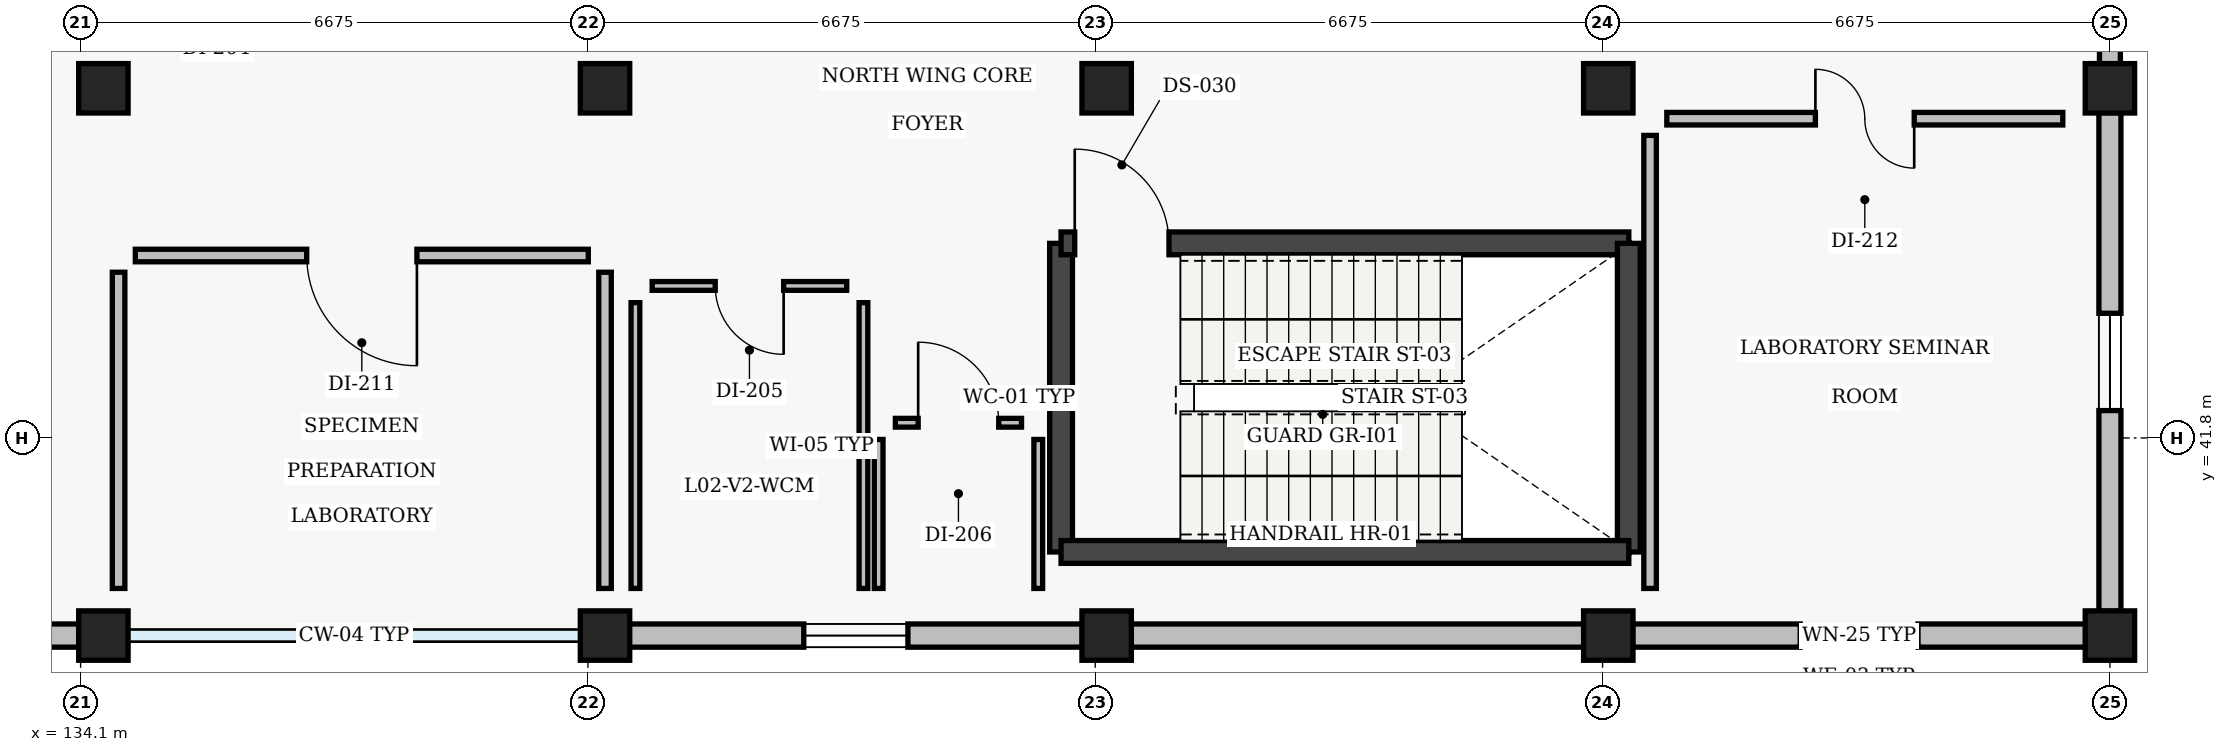
"""IFC4 building model, lengths in metres.
Left out: names, types, materials, properties, quantities, classifications, styles, units other than length and angle.
Written with IfcOpenShell. Run it as: python <this file> out.ifc"""

import sys

from ifc_helpers import new_model, si_unit, direction, frame, frame_2d, origin, origin_2d, place, context, subcontext, project, spatial, rectangle, extrude, element, fill, save


model = new_model("IFC4")
c1 = context("Model", 3, precision=1e-05, world=origin(), true_north=direction((0.0, 1.0)))
c2 = subcontext(c1, "Body", "Model", "MODEL_VIEW")
j1 = project(units=[si_unit("LENGTHUNIT", "METRE"), si_unit("PLANEANGLEUNIT", "RADIAN")], contexts=[c1])
p1 = place(None, origin())
s1 = spatial("IfcSite", under=j1, at=p1, CompositionType="ELEMENT")
p2 = place(p1, origin())
s2 = spatial("IfcBuilding", under=s1, at=p2, CompositionType="ELEMENT")
p3 = place(p2, frame((0.0, 0.0, 9.6)))
s3 = spatial("IfcBuildingStorey", under=s2, at=p3, CompositionType="ELEMENT", Elevation=9.6)
for number, where, z_axis, x_axis in (
    (1, (134.4, 39.2, 0.0), (0.0, 0.0, 1.0), (1.0, 0.0, 0.0)),
    (2, (134.4, 46.4, 0.0), (0.0, 0.0, 1.0), (1.0, 0.0, 0.0)),
    (3, (141.0, 39.2, 0.0), (0.0, 0.0, 1.0), (1.0, 0.0, 0.0)),
    (4, (141.0, 46.4, 0.0), (0.0, 0.0, 1.0), (1.0, 0.0, 0.0)),
    (5, (147.6, 39.2, 0.0), (0.0, 0.0, 1.0), (1.0, 0.0, 0.0)),
    (6, (147.6, 46.4, 0.0), (0.0, 0.0, 1.0), (1.0, 0.0, 0.0)),
    (7, (154.2, 39.2, 0.0), (0.0, 0.0, 1.0), (1.0, 0.0, 0.0)),
    (8, (154.2, 46.4, 0.0), (0.0, 0.0, 1.0), (1.0, 0.0, 0.0)),
    (9, (160.8, 39.2, 0.0), (0.0, 0.0, 1.0), (1.0, 0.0, 0.0)),
    (10, (160.8, 46.4, 0.0), (0.0, 0.0, 1.0), (1.0, 0.0, 0.0)),
):
    element("IfcColumn", number, at=place(p3, frame(where, z_axis=z_axis, x_axis=x_axis)), inside=s3, PredefinedType="COLUMN", context=c2, shape_type="SweptSolid", body=[
        extrude(rectangle(XDim=0.65, YDim=0.65, at=origin_2d()), origin(), (0.0, 0.0, 1.0), 4.3),
    ])
p4 = place(p3, frame((160.8, 53.28, 0.0), z_axis=(0.0, 0.0, 1.0), x_axis=(0.0, -1.0, 0.0)))
e11 = element("IfcWall", 11, at=p4, inside=s3, PredefinedType="STANDARD", context=c2, shape_type="SweptSolid", body=[
    extrude(rectangle(XDim=6.56, YDim=0.275, at=frame_2d((3.28, 0.0))), origin(), (0.0, 0.0, 1.0), 3.835),
])
p5 = place(p4, frame((2.255, 0.0, 0.95)))
e12 = element("IfcOpeningElement", 12, at=p5, cuts=e11, PredefinedType="OPENING", context=c2, shape_type="SweptSolid", body=[
    extrude(rectangle(XDim=2.05, YDim=1.7, at=frame_2d((1.025, 0.85))), frame((0.0, 0.137, 0.0), z_axis=(0.0, -1.0, 0.0), x_axis=(1.0, 0.0, 0.0)), (0.0, 0.0, 1.0), 0.275),
])
p6 = place(p3, frame((160.8, 46.08, 0.0), z_axis=(0.0, 0.0, 1.0), x_axis=(0.0, -1.0, 0.0)))
e13 = element("IfcWall", 13, at=p6, inside=s3, PredefinedType="STANDARD", context=c2, shape_type="SweptSolid", body=[
    extrude(rectangle(XDim=6.56, YDim=0.29, at=frame_2d((3.28, 0.0))), origin(), (0.0, 0.0, 1.0), 3.835),
])
p7 = place(p6, frame((2.64, 0.0, 0.95)))
e14 = element("IfcOpeningElement", 14, at=p7, cuts=e13, PredefinedType="OPENING", context=c2, shape_type="SweptSolid", body=[
    extrude(rectangle(XDim=1.28, YDim=1.42, at=frame_2d((0.64, 0.71))), frame((0.0, 0.145, 0.0), z_axis=(0.0, -1.0, 0.0), x_axis=(1.0, 0.0, 0.0)), (0.0, 0.0, 1.0), 0.29),
])
p8 = place(p3, frame((160.48, 39.2, 0.0), z_axis=(0.0, 0.0, 1.0), x_axis=(-1.0, 0.0, 0.0)))
e15 = element("IfcWall", 15, at=p8, inside=s3, PredefinedType="STANDARD", context=c2, shape_type="SweptSolid", body=[
    extrude(rectangle(XDim=5.96, YDim=0.305, at=frame_2d((2.98, 0.0))), origin(), (0.0, 0.0, 1.0), 3.835),
])
p9 = place(p8, frame((2.205, 0.0, 0.95)))
e16 = element("IfcOpeningElement", 16, at=p9, cuts=e15, PredefinedType="OPENING", context=c2, shape_type="SweptSolid", body=[
    extrude(rectangle(XDim=1.55, YDim=1.46, at=frame_2d((0.775, 0.73))), frame((0.0, 0.152, 0.0), z_axis=(0.0, -1.0, 0.0), x_axis=(1.0, 0.0, 0.0)), (0.0, 0.0, 1.0), 0.305),
])
p10 = place(p3, frame((153.88, 39.2, 0.0), z_axis=(0.0, 0.0, 1.0), x_axis=(-1.0, 0.0, 0.0)))
e17 = element("IfcWall", 17, at=p10, inside=s3, PredefinedType="STANDARD", context=c2, shape_type="SweptSolid", body=[
    extrude(rectangle(XDim=5.96, YDim=0.305, at=frame_2d((2.98, 0.0))), origin(), (0.0, 0.0, 1.0), 3.835),
])
p11 = place(p3, frame((147.28, 39.2, 0.0), z_axis=(0.0, 0.0, 1.0), x_axis=(-1.0, 0.0, 0.0)))
e18 = element("IfcWall", 18, at=p11, inside=s3, PredefinedType="STANDARD", context=c2, shape_type="SweptSolid", body=[
    extrude(rectangle(XDim=5.96, YDim=0.305, at=frame_2d((2.98, 0.0))), origin(), (0.0, 0.0, 1.0), 3.835),
])
p12 = place(p11, frame((2.295, 0.0, 0.95)))
e19 = element("IfcOpeningElement", 19, at=p12, cuts=e18, PredefinedType="OPENING", context=c2, shape_type="SweptSolid", body=[
    extrude(rectangle(XDim=1.37, YDim=1.42, at=frame_2d((0.685, 0.71))), frame((0.0, 0.152, 0.0), z_axis=(0.0, -1.0, 0.0), x_axis=(1.0, 0.0, 0.0)), (0.0, 0.0, 1.0), 0.305),
])
p13 = place(p3, frame((134.08, 39.2, 0.0), z_axis=(0.0, 0.0, 1.0), x_axis=(-1.0, 0.0, 0.0)))
e20 = element("IfcWall", 20, at=p13, inside=s3, PredefinedType="STANDARD", context=c2, shape_type="SweptSolid", body=[
    extrude(rectangle(XDim=5.96, YDim=0.305, at=frame_2d((2.98, 0.0))), origin(), (0.0, 0.0, 1.0), 3.835),
])
p14 = place(p13, frame((2.385, 0.0, 0.95)))
e21 = element("IfcOpeningElement", 21, at=p14, cuts=e20, PredefinedType="OPENING", context=c2, shape_type="SweptSolid", body=[
    extrude(rectangle(XDim=1.19, YDim=1.38, at=frame_2d((0.595, 0.69))), frame((0.0, 0.152, 0.0), z_axis=(0.0, -1.0, 0.0), x_axis=(1.0, 0.0, 0.0)), (0.0, 0.0, 1.0), 0.305),
])
p15 = place(p3, frame((147.0, 40.3, 0.0), z_axis=(0.0, 0.0, 1.0), x_axis=(0.0, 1.0, 0.0)))
e22 = element("IfcWall", 22, at=p15, inside=s3, PredefinedType="SHEAR", context=c2, shape_type="SweptSolid", body=[
    extrude(rectangle(XDim=4.06, YDim=0.3, at=frame_2d((2.03, 0.0))), origin(), (0.0, 0.0, 1.0), 4.28),
])
p16 = place(p3, frame((147.0, 44.36, 0.0), z_axis=(0.0, 0.0, 1.0), x_axis=(1.0, 0.0, 0.0)))
e23 = element("IfcWall", 23, at=p16, inside=s3, PredefinedType="SHEAR", context=c2, shape_type="SweptSolid", body=[
    extrude(rectangle(XDim=7.47, YDim=0.3, at=frame_2d((3.735, 0.0))), origin(), (0.0, 0.0, 1.0), 4.28),
])
p17 = place(p16, frame((0.18, 0.0, 0.0)))
e24 = element("IfcOpeningElement", 24, at=p17, cuts=e23, PredefinedType="OPENING", context=c2, shape_type="SweptSolid", body=[
    extrude(rectangle(XDim=1.24, YDim=2.15, at=frame_2d((0.62, 1.075))), frame((0.0, 0.15, 0.0), z_axis=(0.0, -1.0, 0.0), x_axis=(1.0, 0.0, 0.0)), (0.0, 0.0, 1.0), 0.3),
])
p18 = place(p3, frame((154.47, 44.36, 0.0), z_axis=(0.0, 0.0, 1.0), x_axis=(0.0, -1.0, 0.0)))
e25 = element("IfcWall", 25, at=p18, inside=s3, PredefinedType="SHEAR", context=c2, shape_type="SweptSolid", body=[
    extrude(rectangle(XDim=4.06, YDim=0.3, at=frame_2d((2.03, 0.0))), origin(), (0.0, 0.0, 1.0), 4.28),
])
p19 = place(p3, frame((154.47, 40.3, 0.0), z_axis=(0.0, 0.0, 1.0), x_axis=(-1.0, 0.0, 0.0)))
e26 = element("IfcWall", 26, at=p19, inside=s3, PredefinedType="SHEAR", context=c2, shape_type="SweptSolid", body=[
    extrude(rectangle(XDim=7.47, YDim=0.3, at=frame_2d((3.735, 0.0))), origin(), (0.0, 0.0, 1.0), 4.28),
])
p20 = place(p3, frame((144.4, 39.82, 0.0), z_axis=(0.0, 0.0, 1.0), x_axis=(0.0, 1.0, 0.0)))
e27 = element("IfcWall", 27, at=p20, inside=s3, PredefinedType="PARTITIONING", context=c2, shape_type="SweptSolid", body=[
    extrude(rectangle(XDim=3.76, YDim=0.115, at=frame_2d((1.88, 0.0))), origin(), (0.0, 0.0, 1.0), 3.95),
])
p21 = place(p3, frame((144.18, 43.8, 0.0), z_axis=(0.0, 0.0, 1.0), x_axis=(-1.0, 0.0, 0.0)))
e28 = element("IfcWall", 28, at=p21, inside=s3, PredefinedType="PARTITIONING", context=c2, shape_type="SweptSolid", body=[
    extrude(rectangle(XDim=2.56, YDim=0.115, at=frame_2d((1.28, 0.0))), origin(), (0.0, 0.0, 1.0), 3.95),
])
p22 = place(p21, frame((0.83, 0.0, 0.0)))
e29 = element("IfcOpeningElement", 29, at=p22, cuts=e28, PredefinedType="OPENING", context=c2, shape_type="SweptSolid", body=[
    extrude(rectangle(XDim=0.9, YDim=2.1, at=frame_2d((0.45, 1.05))), frame((0.0, 0.058, 0.0), z_axis=(0.0, -1.0, 0.0), x_axis=(1.0, 0.0, 0.0)), (0.0, 0.0, 1.0), 0.115),
])
p23 = place(p3, frame((141.4, 43.58, 0.0), z_axis=(0.0, 0.0, 1.0), x_axis=(0.0, -1.0, 0.0)))
e30 = element("IfcWall", 30, at=p23, inside=s3, PredefinedType="PARTITIONING", context=c2, shape_type="SweptSolid", body=[
    extrude(rectangle(XDim=3.76, YDim=0.115, at=frame_2d((1.88, 0.0))), origin(), (0.0, 0.0, 1.0), 3.95),
])
p24 = place(p3, frame((146.7, 39.82, 0.0), z_axis=(0.0, 0.0, 1.0), x_axis=(0.0, 1.0, 0.0)))
e31 = element("IfcWall", 31, at=p24, inside=s3, PredefinedType="PARTITIONING", context=c2, shape_type="SweptSolid", body=[
    extrude(rectangle(XDim=1.96, YDim=0.115, at=frame_2d((0.98, 0.0))), origin(), (0.0, 0.0, 1.0), 3.95),
])
p25 = place(p3, frame((146.48, 42.0, 0.0), z_axis=(0.0, 0.0, 1.0), x_axis=(-1.0, 0.0, 0.0)))
e32 = element("IfcWall", 32, at=p25, inside=s3, PredefinedType="PARTITIONING", context=c2, shape_type="SweptSolid", body=[
    extrude(rectangle(XDim=1.66, YDim=0.115, at=frame_2d((0.83, 0.0))), origin(), (0.0, 0.0, 1.0), 3.95),
])
p26 = place(p25, frame((0.3, 0.0, 0.0)))
e33 = element("IfcOpeningElement", 33, at=p26, cuts=e32, PredefinedType="OPENING", context=c2, shape_type="SweptSolid", body=[
    extrude(rectangle(XDim=1.06, YDim=2.12, at=frame_2d((0.53, 1.06))), frame((0.0, 0.058, 0.0), z_axis=(0.0, -1.0, 0.0), x_axis=(1.0, 0.0, 0.0)), (0.0, 0.0, 1.0), 0.115),
])
p27 = place(p3, frame((144.6, 41.78, 0.0), z_axis=(0.0, 0.0, 1.0), x_axis=(0.0, -1.0, 0.0)))
e34 = element("IfcWall", 34, at=p27, inside=s3, PredefinedType="PARTITIONING", context=c2, shape_type="SweptSolid", body=[
    extrude(rectangle(XDim=1.96, YDim=0.115, at=frame_2d((0.98, 0.0))), origin(), (0.0, 0.0, 1.0), 3.95),
])
p28 = place(p3, frame((141.0, 39.82, 0.0), z_axis=(0.0, 0.0, 1.0), x_axis=(0.0, 1.0, 0.0)))
e35 = element("IfcWall", 35, at=p28, inside=s3, PredefinedType="PARTITIONING", context=c2, shape_type="SweptSolid", body=[
    extrude(rectangle(XDim=4.16, YDim=0.165, at=frame_2d((2.08, 0.0))), origin(), (0.0, 0.0, 1.0), 3.635),
])
p29 = place(p3, frame((140.78, 44.2, 0.0), z_axis=(0.0, 0.0, 1.0), x_axis=(-1.0, 0.0, 0.0)))
e36 = element("IfcWall", 36, at=p29, inside=s3, PredefinedType="PARTITIONING", context=c2, shape_type="SweptSolid", body=[
    extrude(rectangle(XDim=5.96, YDim=0.165, at=frame_2d((2.98, 0.0))), origin(), (0.0, 0.0, 1.0), 3.835),
])
p30 = place(p29, frame((2.255, 0.0, 0.0)))
e37 = element("IfcOpeningElement", 37, at=p30, cuts=e36, PredefinedType="OPENING", context=c2, shape_type="SweptSolid", body=[
    extrude(rectangle(XDim=1.45, YDim=2.08, at=frame_2d((0.725, 1.04))), frame((0.0, 0.083, 0.0), z_axis=(0.0, -1.0, 0.0), x_axis=(1.0, 0.0, 0.0)), (0.0, 0.0, 1.0), 0.165),
])
p31 = place(p3, frame((134.6, 43.98, 0.0), z_axis=(0.0, 0.0, 1.0), x_axis=(0.0, -1.0, 0.0)))
e38 = element("IfcWall", 38, at=p31, inside=s3, PredefinedType="PARTITIONING", context=c2, shape_type="SweptSolid", body=[
    extrude(rectangle(XDim=4.16, YDim=0.165, at=frame_2d((2.08, 0.0))), origin(), (0.0, 0.0, 1.0), 3.635),
])
p32 = place(p3, frame((160.18, 46.0, 0.0), z_axis=(0.0, 0.0, 1.0), x_axis=(-1.0, 0.0, 0.0)))
e39 = element("IfcWall", 39, at=p32, inside=s3, PredefinedType="PARTITIONING", context=c2, shape_type="SweptSolid", body=[
    extrude(rectangle(XDim=5.21, YDim=0.165, at=frame_2d((2.605, 0.0))), origin(), (0.0, 0.0, 1.0), 3.95),
])
p33 = place(p32, frame((1.955, 0.0, 0.0)))
e40 = element("IfcOpeningElement", 40, at=p33, cuts=e39, PredefinedType="OPENING", context=c2, shape_type="SweptSolid", body=[
    extrude(rectangle(XDim=1.3, YDim=2.18, at=frame_2d((0.65, 1.09))), frame((0.0, 0.083, 0.0), z_axis=(0.0, -1.0, 0.0), x_axis=(1.0, 0.0, 0.0)), (0.0, 0.0, 1.0), 0.165),
])
p34 = place(p3, frame((154.75, 45.78, 0.0), z_axis=(0.0, 0.0, 1.0), x_axis=(0.0, -1.0, 0.0)))
e41 = element("IfcWall", 41, at=p34, inside=s3, PredefinedType="PARTITIONING", context=c2, shape_type="SweptSolid", body=[
    extrude(rectangle(XDim=5.96, YDim=0.165, at=frame_2d((2.98, 0.0))), origin(), (0.0, 0.0, 1.0), 3.95),
])
p35 = place(p7, origin())
e42 = element("IfcWindow", 42, at=p35, inside=s3, PartitioningType="SINGLE_PANEL", PredefinedType="WINDOW", context=c2, shape_type="SweptSolid", body=[
    extrude(rectangle(XDim=1.28, YDim=1.42, at=frame_2d((0.64, 0.71))), frame((0.0, 0.03, 0.0), z_axis=(0.0, -1.0, 0.0), x_axis=(1.0, 0.0, 0.0)), (0.0, 0.0, 1.0), 0.06),
])
fill(e14, e42)
p36 = place(p9, origin())
e43 = element("IfcWindow", 43, at=p36, inside=s3, PartitioningType="SINGLE_PANEL", PredefinedType="WINDOW", context=c2, shape_type="SweptSolid", body=[
    extrude(rectangle(XDim=1.55, YDim=1.46, at=frame_2d((0.775, 0.73))), frame((0.0, 0.03, 0.0), z_axis=(0.0, -1.0, 0.0), x_axis=(1.0, 0.0, 0.0)), (0.0, 0.0, 1.0), 0.06),
])
fill(e16, e43)
p37 = place(p12, origin())
e44 = element("IfcWindow", 44, at=p37, inside=s3, PartitioningType="SINGLE_PANEL", PredefinedType="WINDOW", context=c2, shape_type="SweptSolid", body=[
    extrude(rectangle(XDim=1.37, YDim=1.42, at=frame_2d((0.685, 0.71))), frame((0.0, 0.03, 0.0), z_axis=(0.0, -1.0, 0.0), x_axis=(1.0, 0.0, 0.0)), (0.0, 0.0, 1.0), 0.06),
])
fill(e19, e44)
p38 = place(p17, origin())
e45 = element("IfcDoor", 45, at=p38, inside=s3, OperationType="SINGLE_SWING_LEFT", PredefinedType="DOOR", context=c2, shape_type="SweptSolid", body=[
    extrude(rectangle(XDim=1.24, YDim=2.15, at=frame_2d((0.62, 1.075))), frame((0.0, 0.025, 0.0), z_axis=(0.0, -1.0, 0.0), x_axis=(1.0, 0.0, 0.0)), (0.0, 0.0, 1.0), 0.05),
])
fill(e24, e45)
p39 = place(p22, origin())
e46 = element("IfcDoor", 46, at=p39, inside=s3, OperationType="SINGLE_SWING_LEFT", PredefinedType="DOOR", context=c2, shape_type="SweptSolid", body=[
    extrude(rectangle(XDim=0.9, YDim=2.1, at=frame_2d((0.45, 1.05))), frame((0.0, 0.025, 0.0), z_axis=(0.0, -1.0, 0.0), x_axis=(1.0, 0.0, 0.0)), (0.0, 0.0, 1.0), 0.05),
])
fill(e29, e46)
p40 = place(p26, origin())
e47 = element("IfcDoor", 47, at=p40, inside=s3, OperationType="SINGLE_SWING_RIGHT", PredefinedType="DOOR", context=c2, shape_type="SweptSolid", body=[
    extrude(rectangle(XDim=1.06, YDim=2.12, at=frame_2d((0.53, 1.06))), frame((0.0, 0.025, 0.0), z_axis=(0.0, -1.0, 0.0), x_axis=(1.0, 0.0, 0.0)), (0.0, 0.0, 1.0), 0.05),
])
fill(e33, e47)
p41 = place(p30, origin())
e48 = element("IfcDoor", 48, at=p41, inside=s3, OperationType="SINGLE_SWING_LEFT", PredefinedType="DOOR", context=c2, shape_type="SweptSolid", body=[
    extrude(rectangle(XDim=1.45, YDim=2.08, at=frame_2d((0.725, 1.04))), frame((0.0, 0.025, 0.0), z_axis=(0.0, -1.0, 0.0), x_axis=(1.0, 0.0, 0.0)), (0.0, 0.0, 1.0), 0.05),
])
fill(e37, e48)
p42 = place(p33, origin())
e49 = element("IfcDoor", 49, at=p42, inside=s3, OperationType="DOUBLE_DOOR_SINGLE_SWING", PredefinedType="DOOR", context=c2, shape_type="SweptSolid", body=[
    extrude(rectangle(XDim=1.3, YDim=2.18, at=frame_2d((0.65, 1.09))), frame((0.0, 0.025, 0.0), z_axis=(0.0, -1.0, 0.0), x_axis=(1.0, 0.0, 0.0)), (0.0, 0.0, 1.0), 0.05),
])
fill(e40, e49)
save(model, sys.argv[1])
